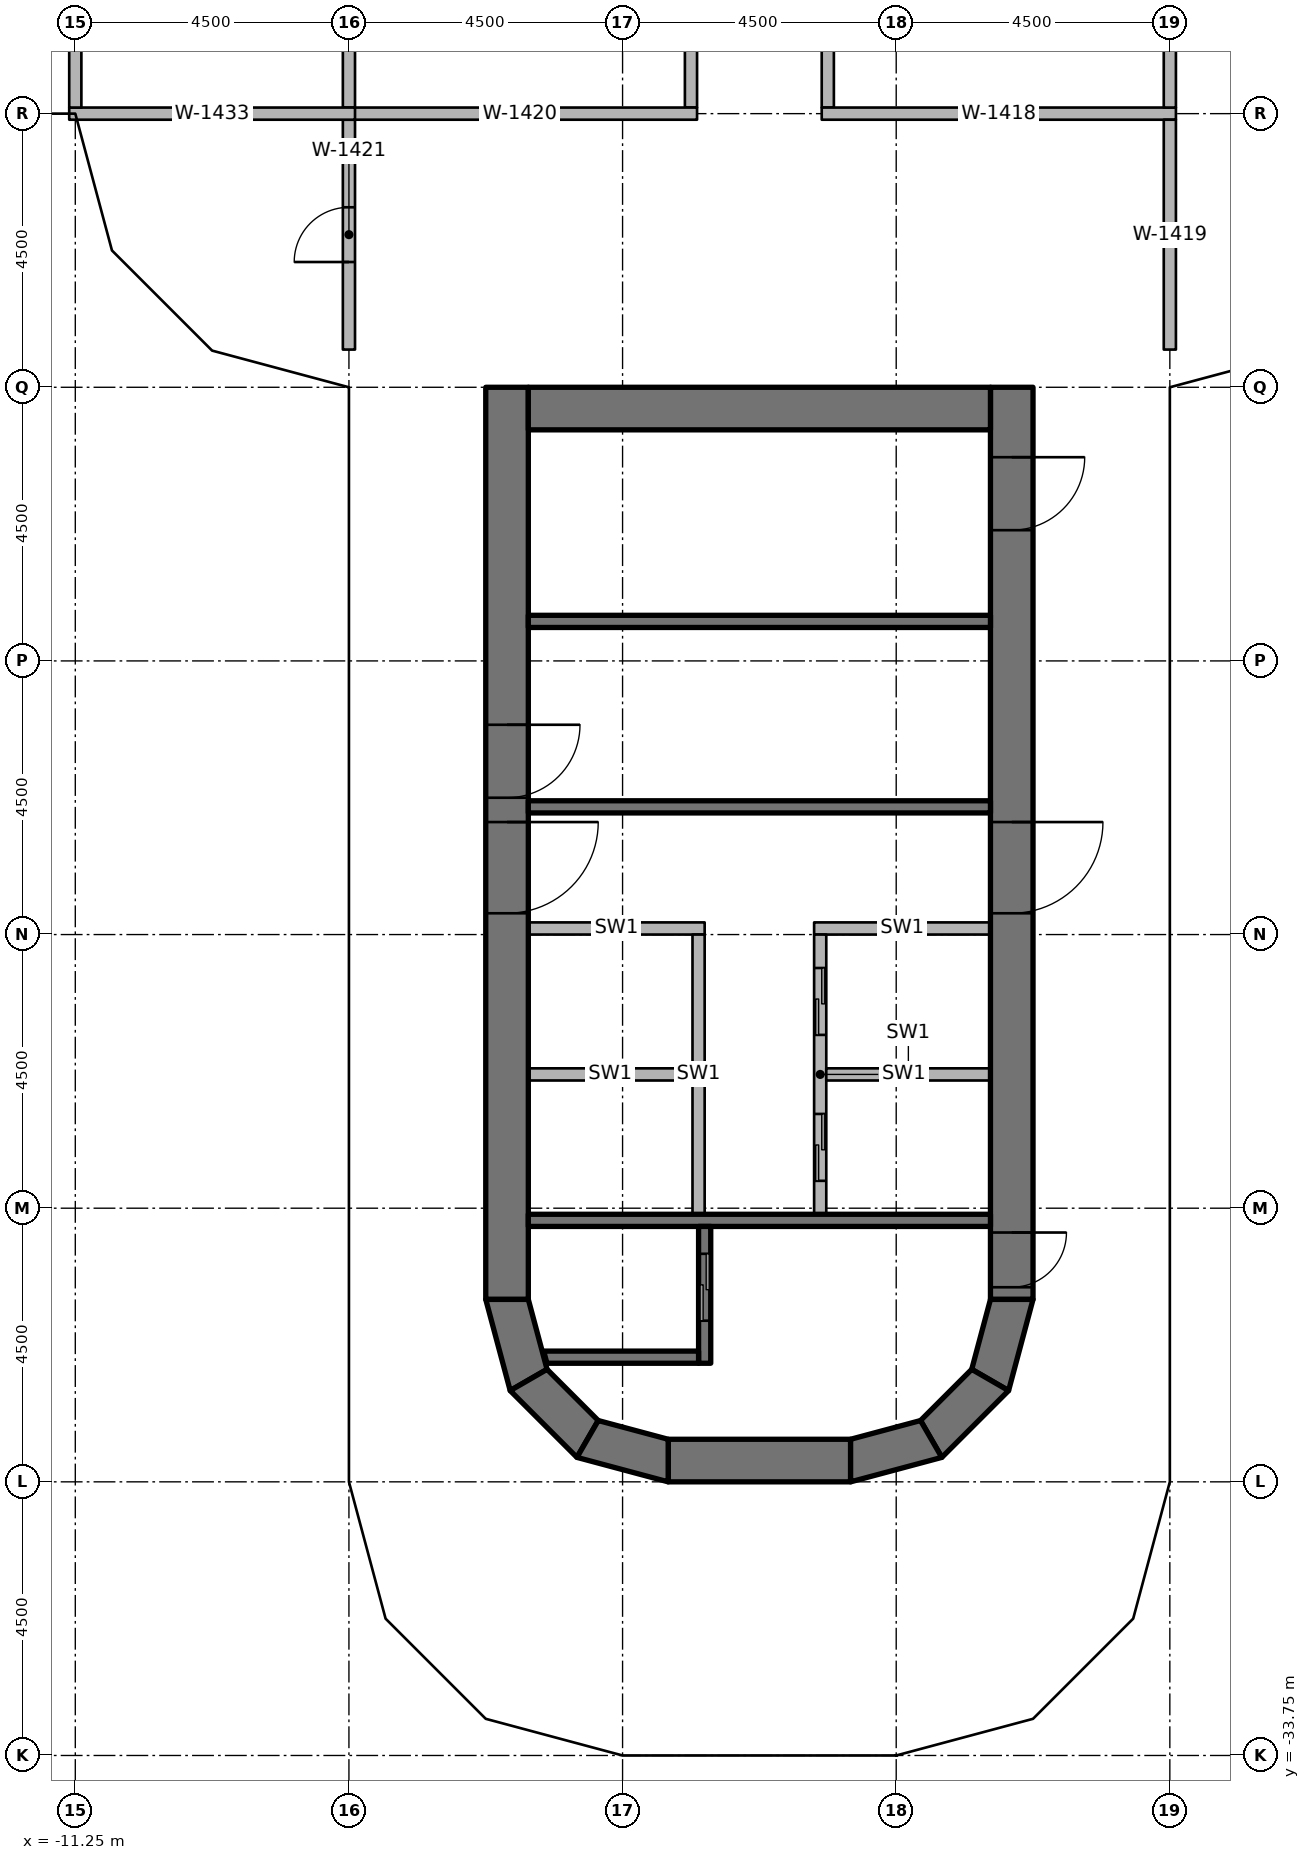
"""IFC4 building model, lengths in metres.
Left out: names, types, materials, properties, quantities, classifications, styles, units other than length and angle.
Written with IfcOpenShell. Run it as: python <this file> out.ifc"""

import sys

from ifc_helpers import new_model, si_unit, direction, frame, frame_2d, origin, origin_2d, place, context, subcontext, project, spatial, polyline, rectangle, outline, extrude, element, fill, save


model = new_model("IFC4")
c1 = context("Model", 3, precision=1e-05, world=origin(), true_north=direction((0.0, 1.0)))
c2 = subcontext(c1, "Body", "Model", "MODEL_VIEW")
j1 = project(units=[si_unit("LENGTHUNIT", "METRE"), si_unit("PLANEANGLEUNIT", "RADIAN")], contexts=[c1])
p1 = place(None, origin())
s1 = spatial("IfcSite", under=j1, at=p1, CompositionType="ELEMENT")
p2 = place(p1, origin())
s2 = spatial("IfcBuilding", under=s1, at=p2, CompositionType="ELEMENT")
p3 = place(p2, frame((0.0, 0.0, 141.0)))
s3 = spatial("IfcBuildingStorey", under=s2, at=p3, CompositionType="ELEMENT", Elevation=141.0)
for number, where, z_axis, x_axis in (
    (1, (-10.75, -6.25, 0.0), (0.0, 0.0, 1.0), (1.0, 0.0, 0.0)),
    (2, (-6.25, -26.9, 0.0), (0.0, 0.0, 1.0), (1.0, 0.0, 0.0)),
    (3, (-6.25, -24.65, 0.0), (0.0, 0.0, 1.0), (1.0, 0.0, 0.0)),
    (4, (-6.25, -20.25, 0.0), (0.0, 0.0, 1.0), (1.0, 0.0, 0.0)),
    (5, (-6.25, -15.75, 0.0), (0.0, 0.0, 1.0), (1.0, 0.0, 0.0)),
    (6, (-6.25, -10.75, 0.0), (0.0, 0.0, 1.0), (1.0, 0.0, 0.0)),
    (7, (-6.25, -6.25, 0.0), (0.0, 0.0, 1.0), (1.0, 0.0, 0.0)),
    (8, (-2.25, -33.11, 0.0), (0.0, 0.0, 1.0), (1.0, 0.0, 0.0)),
    (9, (2.25, -33.11, 0.0), (0.0, 0.0, 1.0), (1.0, 0.0, 0.0)),
    (10, (6.25, -26.9, 0.0), (0.0, 0.0, 1.0), (1.0, 0.0, 0.0)),
    (11, (6.25, -24.65, 0.0), (0.0, 0.0, 1.0), (1.0, 0.0, 0.0)),
    (12, (6.25, -20.25, 0.0), (0.0, 0.0, 1.0), (1.0, 0.0, 0.0)),
    (13, (6.25, -15.75, 0.0), (0.0, 0.0, 1.0), (1.0, 0.0, 0.0)),
    (14, (6.25, -10.75, 0.0), (0.0, 0.0, 1.0), (1.0, 0.0, 0.0)),
    (15, (6.25, -6.25, 0.0), (0.0, 0.0, 1.0), (1.0, 0.0, 0.0)),
):
    element("IfcColumn", number, at=place(p3, frame(where, z_axis=z_axis, x_axis=x_axis)), inside=s3, PredefinedType="COLUMN", context=c2, shape_type="SweptSolid", body=[
        extrude(rectangle(XDim=0.8, YDim=0.8, at=origin_2d()), origin(), (0.0, 0.0, 1.0), 3.65),
    ])
p4 = place(p3, frame((-4.15, -11.25, 0.0), z_axis=(0.0, 0.0, 1.0), x_axis=(0.0, -1.0, 0.0)))
e16 = element("IfcWall", 16, at=p4, inside=s3, PredefinedType="SHEAR", context=c2, shape_type="SweptSolid", body=[
    extrude(rectangle(XDim=15.0, YDim=0.7, at=frame_2d((7.5, 0.0))), origin(), (0.0, 0.0, 1.0), 3.8),
])
p5 = place(p4, frame((7.15, 0.0, 0.0)))
e17 = element("IfcOpeningElement", 17, at=p5, cuts=e16, PredefinedType="OPENING", context=c2, shape_type="SweptSolid", body=[
    extrude(rectangle(XDim=1.5, YDim=2.3, at=frame_2d((0.75, 1.15))), frame((0.0, 0.36, 0.0), z_axis=(0.0, -1.0, 0.0), x_axis=(1.0, 0.0, 0.0)), (0.0, 0.0, 1.0), 0.72),
])
p6 = place(p4, frame((5.55, 0.0, 0.0)))
e18 = element("IfcOpeningElement", 18, at=p6, cuts=e16, PredefinedType="OPENING", context=c2, shape_type="SweptSolid", body=[
    extrude(rectangle(XDim=1.2, YDim=2.1, at=frame_2d((0.6, 1.05))), frame((0.0, 0.36, 0.0), z_axis=(0.0, -1.0, 0.0), x_axis=(1.0, 0.0, 0.0)), (0.0, 0.0, 1.0), 0.72),
])
p7 = place(p3, frame((4.15, -11.25, 0.0), z_axis=(0.0, 0.0, 1.0), x_axis=(0.0, -1.0, 0.0)))
e19 = element("IfcWall", 19, at=p7, inside=s3, PredefinedType="SHEAR", context=c2, shape_type="SweptSolid", body=[
    extrude(rectangle(XDim=15.0, YDim=0.7, at=frame_2d((7.5, 0.0))), origin(), (0.0, 0.0, 1.0), 3.8),
])
p8 = place(p7, frame((7.15, 0.0, 0.0)))
e20 = element("IfcOpeningElement", 20, at=p8, cuts=e19, PredefinedType="OPENING", context=c2, shape_type="SweptSolid", body=[
    extrude(rectangle(XDim=1.5, YDim=2.3, at=frame_2d((0.75, 1.15))), frame((0.0, 0.36, 0.0), z_axis=(0.0, -1.0, 0.0), x_axis=(1.0, 0.0, 0.0)), (0.0, 0.0, 1.0), 0.72),
])
p9 = place(p7, frame((13.9, 0.0, 0.0)))
e21 = element("IfcOpeningElement", 21, at=p9, cuts=e19, PredefinedType="OPENING", context=c2, shape_type="SweptSolid", body=[
    extrude(rectangle(XDim=0.9, YDim=2.1, at=frame_2d((0.45, 1.05))), frame((0.0, 0.36, 0.0), z_axis=(0.0, -1.0, 0.0), x_axis=(1.0, 0.0, 0.0)), (0.0, 0.0, 1.0), 0.72),
])
p10 = place(p7, frame((1.15, 0.0, 0.0)))
e22 = element("IfcOpeningElement", 22, at=p10, cuts=e19, PredefinedType="OPENING", context=c2, shape_type="SweptSolid", body=[
    extrude(rectangle(XDim=1.2, YDim=2.1, at=frame_2d((0.6, 1.05))), frame((0.0, 0.36, 0.0), z_axis=(0.0, -1.0, 0.0), x_axis=(1.0, 0.0, 0.0)), (0.0, 0.0, 1.0), 0.72),
])
p11 = place(p3, frame((-3.8, -11.6, 0.0), z_axis=(0.0, 0.0, 1.0), x_axis=(1.0, 0.0, 0.0)))
e23 = element("IfcWall", 23, at=p11, inside=s3, PredefinedType="SHEAR", context=c2, shape_type="SweptSolid", body=[
    extrude(rectangle(XDim=7.6, YDim=0.7, at=frame_2d((3.8, 0.0))), origin(), (0.0, 0.0, 1.0), 3.8),
])
p12 = place(p3, frame((-1.5, -28.9, 0.0), z_axis=(0.0, 0.0, 1.0), x_axis=(1.0, 0.0, 0.0)))
e24 = element("IfcWall", 24, at=p12, inside=s3, PredefinedType="SHEAR", context=c2, shape_type="SweptSolid", body=[
    extrude(rectangle(XDim=3.0, YDim=0.7, at=frame_2d((1.5, 0.0))), origin(), (0.0, 0.0, 1.0), 3.8),
])
p13 = place(p3, origin())
e25 = element("IfcWall", 25, at=p13, inside=s3, PredefinedType="SHEAR", context=c2, shape_type="SweptSolid", body=[
    extrude(outline(polyline([(-4.5, -26.25), (-4.098, -27.75), (-3.492, -27.4), (-3.8, -26.25), (-4.5, -26.25)])), origin(), (0.0, 0.0, 1.0), 3.8),
])
p14 = place(p3, origin())
e26 = element("IfcWall", 26, at=p14, inside=s3, PredefinedType="SHEAR", context=c2, shape_type="SweptSolid", body=[
    extrude(outline(polyline([(-4.098, -27.75), (-3.0, -28.848), (-2.65, -28.242), (-3.492, -27.4), (-4.098, -27.75)])), origin(), (0.0, 0.0, 1.0), 3.8),
])
p15 = place(p3, origin())
e27 = element("IfcWall", 27, at=p15, inside=s3, PredefinedType="SHEAR", context=c2, shape_type="SweptSolid", body=[
    extrude(outline(polyline([(-3.0, -28.848), (-1.5, -29.25), (-1.5, -28.55), (-2.65, -28.242), (-3.0, -28.848)])), origin(), (0.0, 0.0, 1.0), 3.8),
])
p16 = place(p3, origin())
e28 = element("IfcWall", 28, at=p16, inside=s3, PredefinedType="SHEAR", context=c2, shape_type="SweptSolid", body=[
    extrude(outline(polyline([(4.5, -26.25), (4.098, -27.75), (3.492, -27.4), (3.8, -26.25), (4.5, -26.25)])), origin(), (0.0, 0.0, 1.0), 3.8),
])
p17 = place(p3, origin())
e29 = element("IfcWall", 29, at=p17, inside=s3, PredefinedType="SHEAR", context=c2, shape_type="SweptSolid", body=[
    extrude(outline(polyline([(4.098, -27.75), (3.0, -28.848), (2.65, -28.242), (3.492, -27.4), (4.098, -27.75)])), origin(), (0.0, 0.0, 1.0), 3.8),
])
p18 = place(p3, origin())
e30 = element("IfcWall", 30, at=p18, inside=s3, PredefinedType="SHEAR", context=c2, shape_type="SweptSolid", body=[
    extrude(outline(polyline([(3.0, -28.848), (1.5, -29.25), (1.5, -28.55), (2.65, -28.242), (3.0, -28.848)])), origin(), (0.0, 0.0, 1.0), 3.8),
])
p19 = place(p3, frame((3.8, -24.95, 0.0), z_axis=(0.0, 0.0, 1.0), x_axis=(-1.0, 0.0, 0.0)))
e31 = element("IfcWall", 31, at=p19, inside=s3, PredefinedType="SHEAR", context=c2, shape_type="SweptSolid", body=[
    extrude(rectangle(XDim=7.6, YDim=0.2, at=frame_2d((3.8, 0.0))), origin(), (0.0, 0.0, 1.0), 3.65),
])
p20 = place(p3, frame((-0.9, -27.3, 0.0), z_axis=(0.0, 0.0, 1.0), x_axis=(0.0, 1.0, 0.0)))
e32 = element("IfcWall", 32, at=p20, inside=s3, PredefinedType="SHEAR", context=c2, shape_type="SweptSolid", body=[
    extrude(rectangle(XDim=2.25, YDim=0.2, at=frame_2d((1.125, 0.0))), origin(), (0.0, 0.0, 1.0), 3.65),
])
p21 = place(p20, frame((0.7, 0.0, 0.0)))
e33 = element("IfcOpeningElement", 33, at=p21, cuts=e32, PredefinedType="OPENING", context=c2, shape_type="SweptSolid", body=[
    extrude(rectangle(XDim=1.1, YDim=2.3, at=frame_2d((0.55, 1.15))), frame((0.0, 0.11, 0.0), z_axis=(0.0, -1.0, 0.0), x_axis=(1.0, 0.0, 0.0)), (0.0, 0.0, 1.0), 0.22),
])
p22 = place(p3, origin())
e34 = element("IfcWall", 34, at=p22, inside=s3, PredefinedType="SHEAR", context=c2, shape_type="SweptSolid", body=[
    extrude(outline(polyline([(-1.0, -27.1), (-3.548, -27.1), (-3.494, -27.3), (-1.0, -27.3), (-1.0, -27.1)])), origin(), (0.0, 0.0, 1.0), 3.65),
])
for number, where, z_axis, x_axis in (
    (35, (3.8, -18.15, 0.0), (0.0, 0.0, 1.0), (-1.0, 0.0, 0.0)),
    (36, (3.8, -15.1, 0.0), (0.0, 0.0, 1.0), (-1.0, 0.0, 0.0)),
):
    element("IfcWall", number, at=place(p3, frame(where, z_axis=z_axis, x_axis=x_axis)), inside=s3, PredefinedType="SHEAR", context=c2, shape_type="SweptSolid", body=[
        extrude(rectangle(XDim=7.6, YDim=0.2, at=frame_2d((3.8, 0.0))), origin(), (0.0, 0.0, 1.0), 3.65),
    ])
p23 = place(p3, frame((3.8, -20.15, 0.0), z_axis=(0.0, 0.0, 1.0), x_axis=(-1.0, 0.0, 0.0)))
e37 = element("IfcWall", 37, at=p23, inside=s3, PredefinedType="PARTITIONING", context=c2, shape_type="SweptSolid", body=[
    extrude(rectangle(XDim=2.9, YDim=0.2, at=frame_2d((1.45, 0.0))), origin(), (0.0, 0.0, 1.0), 3.65),
])
p24 = place(p3, frame((1.0, -24.85, 0.0), z_axis=(0.0, 0.0, 1.0), x_axis=(0.0, 1.0, 0.0)))
e38 = element("IfcWall", 38, at=p24, inside=s3, PredefinedType="PARTITIONING", context=c2, shape_type="SweptSolid", body=[
    extrude(rectangle(XDim=4.6, YDim=0.2, at=frame_2d((2.3, 0.0))), origin(), (0.0, 0.0, 1.0), 3.65),
])
p25 = place(p24, frame((0.55, 0.0, 0.0)))
e39 = element("IfcOpeningElement", 39, at=p25, cuts=e38, PredefinedType="OPENING", context=c2, shape_type="SweptSolid", body=[
    extrude(rectangle(XDim=1.1, YDim=2.3, at=frame_2d((0.55, 1.15))), frame((0.0, 0.11, 0.0), z_axis=(0.0, -1.0, 0.0), x_axis=(1.0, 0.0, 0.0)), (0.0, 0.0, 1.0), 0.22),
])
p26 = place(p24, frame((2.95, 0.0, 0.0)))
e40 = element("IfcOpeningElement", 40, at=p26, cuts=e38, PredefinedType="OPENING", context=c2, shape_type="SweptSolid", body=[
    extrude(rectangle(XDim=1.1, YDim=2.3, at=frame_2d((0.55, 1.15))), frame((0.0, 0.11, 0.0), z_axis=(0.0, -1.0, 0.0), x_axis=(1.0, 0.0, 0.0)), (0.0, 0.0, 1.0), 0.22),
])
p27 = place(p3, frame((-0.9, -20.15, 0.0), z_axis=(0.0, 0.0, 1.0), x_axis=(-1.0, 0.0, 0.0)))
e41 = element("IfcWall", 41, at=p27, inside=s3, PredefinedType="PARTITIONING", context=c2, shape_type="SweptSolid", body=[
    extrude(rectangle(XDim=2.9, YDim=0.2, at=frame_2d((1.45, 0.0))), origin(), (0.0, 0.0, 1.0), 3.65),
])
p28 = place(p3, frame((-1.0, -24.85, 0.0), z_axis=(0.0, 0.0, 1.0), x_axis=(0.0, 1.0, 0.0)))
e42 = element("IfcWall", 42, at=p28, inside=s3, PredefinedType="PARTITIONING", context=c2, shape_type="SweptSolid", body=[
    extrude(rectangle(XDim=4.6, YDim=0.2, at=frame_2d((2.3, 0.0))), origin(), (0.0, 0.0, 1.0), 3.65),
])
for number, where, z_axis, x_axis in (
    (43, (3.8, -22.55, 0.0), (0.0, 0.0, 1.0), (-1.0, 0.0, 0.0)),
    (44, (-1.1, -22.55, 0.0), (0.0, 0.0, 1.0), (-1.0, 0.0, 0.0)),
):
    element("IfcWall", number, at=place(p3, frame(where, z_axis=z_axis, x_axis=x_axis)), inside=s3, PredefinedType="PARTITIONING", context=c2, shape_type="SweptSolid", body=[
        extrude(rectangle(XDim=2.7, YDim=0.2, at=frame_2d((1.35, 0.0))), origin(), (0.0, 0.0, 1.0), 3.65),
    ])
for number, where, z_axis, x_axis in (
    (45, (1.125, -6.65, 0.0), (0.0, 0.0, 1.0), (0.0, 1.0, 0.0)),
    (46, (-1.125, -6.65, 0.0), (0.0, 0.0, 1.0), (0.0, 1.0, 0.0)),
):
    element("IfcWall", number, at=place(p3, frame(where, z_axis=z_axis, x_axis=x_axis)), inside=s3, PredefinedType="PARTITIONING", context=c2, shape_type="SweptSolid", body=[
        extrude(rectangle(XDim=5.425, YDim=0.2, at=frame_2d((2.712, 0.0))), origin(), (0.0, 0.0, 1.0), 2.75),
    ])
p29 = place(p3, frame((1.025, -6.75, 0.0), z_axis=(0.0, 0.0, 1.0), x_axis=(1.0, 0.0, 0.0)))
e47 = element("IfcWall", 47, at=p29, inside=s3, PredefinedType="PARTITIONING", context=c2, shape_type="SweptSolid", body=[
    extrude(rectangle(XDim=5.825, YDim=0.2, at=frame_2d((2.913, 0.0))), origin(), (0.0, 0.0, 1.0), 2.75),
])
p30 = place(p3, frame((6.75, -10.63, 0.0), z_axis=(0.0, 0.0, 1.0), x_axis=(0.0, 1.0, 0.0)))
e48 = element("IfcWall", 48, at=p30, inside=s3, PredefinedType="PARTITIONING", context=c2, shape_type="SweptSolid", body=[
    extrude(rectangle(XDim=3.78, YDim=0.2, at=frame_2d((1.89, 0.0))), origin(), (0.0, 0.0, 1.0), 2.75),
])
p31 = place(p3, frame((-6.85, -6.75, 0.0), z_axis=(0.0, 0.0, 1.0), x_axis=(1.0, 0.0, 0.0)))
e49 = element("IfcWall", 49, at=p31, inside=s3, PredefinedType="PARTITIONING", context=c2, shape_type="SweptSolid", body=[
    extrude(rectangle(XDim=5.825, YDim=0.2, at=frame_2d((2.913, 0.0))), origin(), (0.0, 0.0, 1.0), 2.75),
])
p32 = place(p3, frame((-6.75, -10.63, 0.0), z_axis=(0.0, 0.0, 1.0), x_axis=(0.0, 1.0, 0.0)))
e50 = element("IfcWall", 50, at=p32, inside=s3, PredefinedType="PARTITIONING", context=c2, shape_type="SweptSolid", body=[
    extrude(rectangle(XDim=3.78, YDim=0.2, at=frame_2d((1.89, 0.0))), origin(), (0.0, 0.0, 1.0), 2.75),
])
p33 = place(p32, frame((1.44, 0.0, 0.0)))
e51 = element("IfcOpeningElement", 51, at=p33, cuts=e50, PredefinedType="OPENING", context=c2, shape_type="SweptSolid", body=[
    extrude(rectangle(XDim=0.9, YDim=2.1, at=frame_2d((0.45, 1.05))), frame((0.0, 0.11, 0.0), z_axis=(0.0, -1.0, 0.0), x_axis=(1.0, 0.0, 0.0)), (0.0, 0.0, 1.0), 0.22),
])
for number, where, z_axis, x_axis in (
    (52, (6.75, -6.65, 0.0), (0.0, 0.0, 1.0), (0.0, 1.0, 0.0)),
    (53, (-6.75, -6.65, 0.0), (0.0, 0.0, 1.0), (0.0, 1.0, 0.0)),
):
    element("IfcWall", number, at=place(p3, frame(where, z_axis=z_axis, x_axis=x_axis)), inside=s3, PredefinedType="PARTITIONING", context=c2, shape_type="SweptSolid", body=[
        extrude(rectangle(XDim=5.425, YDim=0.2, at=frame_2d((2.712, 0.0))), origin(), (0.0, 0.0, 1.0), 2.75),
    ])
p34 = place(p3, frame((-11.35, -6.75, 0.0), z_axis=(0.0, 0.0, 1.0), x_axis=(1.0, 0.0, 0.0)))
e54 = element("IfcWall", 54, at=p34, inside=s3, PredefinedType="PARTITIONING", context=c2, shape_type="SweptSolid", body=[
    extrude(rectangle(XDim=4.7, YDim=0.2, at=frame_2d((2.35, 0.0))), origin(), (0.0, 0.0, 1.0), 2.75),
])
p35 = place(p3, frame((-11.25, -6.65, 0.0), z_axis=(0.0, 0.0, 1.0), x_axis=(0.0, 1.0, 0.0)))
e55 = element("IfcWall", 55, at=p35, inside=s3, PredefinedType="PARTITIONING", context=c2, shape_type="SweptSolid", body=[
    extrude(rectangle(XDim=5.425, YDim=0.2, at=frame_2d((2.712, 0.0))), origin(), (0.0, 0.0, 1.0), 2.75),
])
p36 = place(p8, origin())
e56 = element("IfcDoor", 56, at=p36, inside=s3, OperationType="DOUBLE_DOOR_SINGLE_SWING", PredefinedType="DOOR", context=c2, shape_type="SweptSolid", body=[
    extrude(rectangle(XDim=1.5, YDim=2.3, at=frame_2d((0.75, 1.15))), frame((0.0, 0.025, 0.0), z_axis=(0.0, -1.0, 0.0), x_axis=(1.0, 0.0, 0.0)), (0.0, 0.0, 1.0), 0.05),
])
fill(e20, e56)
p37 = place(p5, origin())
e57 = element("IfcDoor", 57, at=p37, inside=s3, OperationType="DOUBLE_DOOR_SINGLE_SWING", PredefinedType="DOOR", context=c2, shape_type="SweptSolid", body=[
    extrude(rectangle(XDim=1.5, YDim=2.3, at=frame_2d((0.75, 1.15))), frame((0.0, 0.025, 0.0), z_axis=(0.0, -1.0, 0.0), x_axis=(1.0, 0.0, 0.0)), (0.0, 0.0, 1.0), 0.05),
])
fill(e17, e57)
p38 = place(p9, origin())
e58 = element("IfcDoor", 58, at=p38, inside=s3, OperationType="SINGLE_SWING_LEFT", PredefinedType="DOOR", context=c2, shape_type="SweptSolid", body=[
    extrude(rectangle(XDim=0.9, YDim=2.1, at=frame_2d((0.45, 1.05))), frame((0.0, 0.025, 0.0), z_axis=(0.0, -1.0, 0.0), x_axis=(1.0, 0.0, 0.0)), (0.0, 0.0, 1.0), 0.05),
])
fill(e21, e58)
p39 = place(p6, origin())
e59 = element("IfcDoor", 59, at=p39, inside=s3, OperationType="SINGLE_SWING_LEFT", PredefinedType="DOOR", context=c2, shape_type="SweptSolid", body=[
    extrude(rectangle(XDim=1.2, YDim=2.1, at=frame_2d((0.6, 1.05))), frame((0.0, 0.025, 0.0), z_axis=(0.0, -1.0, 0.0), x_axis=(1.0, 0.0, 0.0)), (0.0, 0.0, 1.0), 0.05),
])
fill(e18, e59)
p40 = place(p10, origin())
e60 = element("IfcDoor", 60, at=p40, inside=s3, OperationType="SINGLE_SWING_LEFT", PredefinedType="DOOR", context=c2, shape_type="SweptSolid", body=[
    extrude(rectangle(XDim=1.2, YDim=2.1, at=frame_2d((0.6, 1.05))), frame((0.0, 0.025, 0.0), z_axis=(0.0, -1.0, 0.0), x_axis=(1.0, 0.0, 0.0)), (0.0, 0.0, 1.0), 0.05),
])
fill(e22, e60)
p41 = place(p21, origin())
e61 = element("IfcDoor", 61, at=p41, inside=s3, OperationType="DOUBLE_DOOR_SLIDING", PredefinedType="DOOR", context=c2, shape_type="SweptSolid", body=[
    extrude(rectangle(XDim=1.1, YDim=2.3, at=frame_2d((0.55, 1.15))), frame((0.0, 0.025, 0.0), z_axis=(0.0, -1.0, 0.0), x_axis=(1.0, 0.0, 0.0)), (0.0, 0.0, 1.0), 0.05),
])
fill(e33, e61)
p42 = place(p25, origin())
e62 = element("IfcDoor", 62, at=p42, inside=s3, OperationType="DOUBLE_DOOR_SLIDING", PredefinedType="DOOR", context=c2, shape_type="SweptSolid", body=[
    extrude(rectangle(XDim=1.1, YDim=2.3, at=frame_2d((0.55, 1.15))), frame((0.0, 0.025, 0.0), z_axis=(0.0, -1.0, 0.0), x_axis=(1.0, 0.0, 0.0)), (0.0, 0.0, 1.0), 0.05),
])
fill(e39, e62)
p43 = place(p26, origin())
e63 = element("IfcDoor", 63, at=p43, inside=s3, OperationType="DOUBLE_DOOR_SLIDING", PredefinedType="DOOR", context=c2, shape_type="SweptSolid", body=[
    extrude(rectangle(XDim=1.1, YDim=2.3, at=frame_2d((0.55, 1.15))), frame((0.0, 0.025, 0.0), z_axis=(0.0, -1.0, 0.0), x_axis=(1.0, 0.0, 0.0)), (0.0, 0.0, 1.0), 0.05),
])
fill(e40, e63)
p44 = place(p33, origin())
e64 = element("IfcDoor", 64, at=p44, inside=s3, OperationType="SINGLE_SWING_RIGHT", PredefinedType="DOOR", context=c2, shape_type="SweptSolid", body=[
    extrude(rectangle(XDim=0.9, YDim=2.1, at=frame_2d((0.45, 1.05))), frame((0.0, 0.025, 0.0), z_axis=(0.0, -1.0, 0.0), x_axis=(1.0, 0.0, 0.0)), (0.0, 0.0, 1.0), 0.05),
])
fill(e51, e64)
save(model, sys.argv[1])
